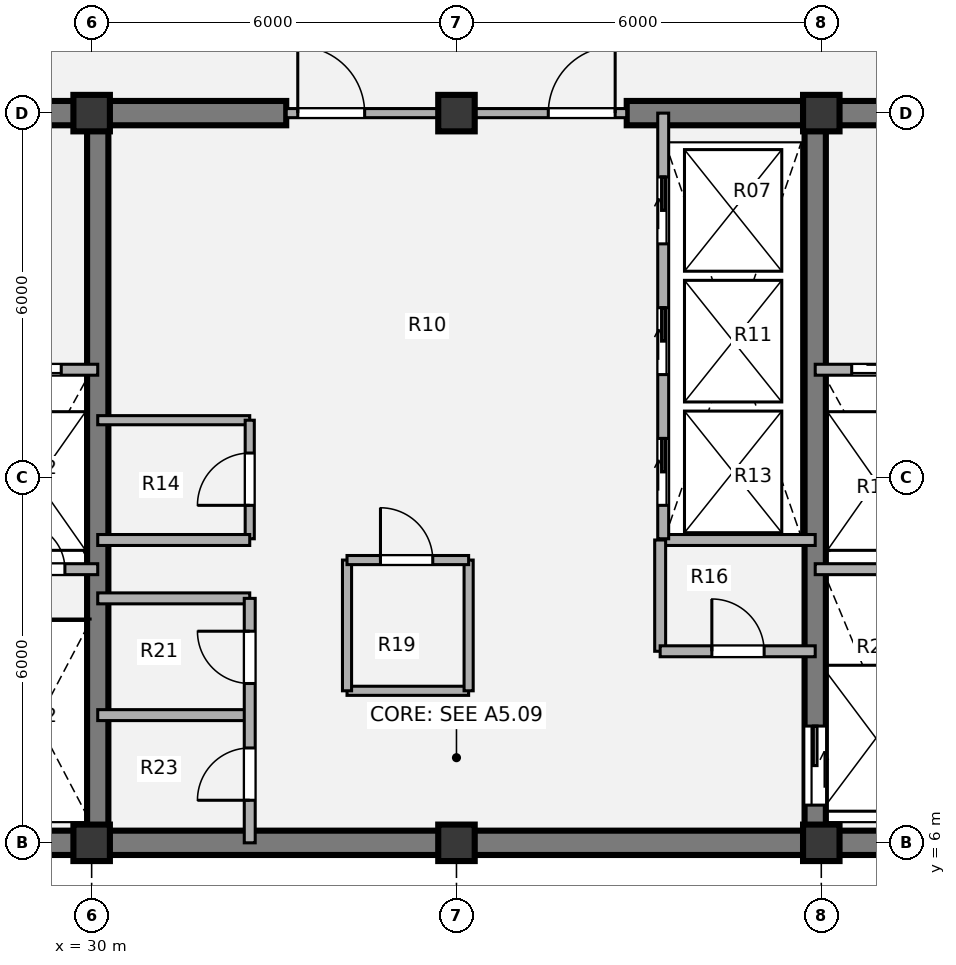
"""IFC4 building model, lengths in metres.
Left out: names, types, materials, properties, quantities, classifications, styles, units other than length and angle.
Written with IfcOpenShell. Run it as: python <this file> out.ifc"""

import sys

from ifc_helpers import new_model, si_unit, direction, frame, frame_2d, origin, origin_2d, place, context, subcontext, project, spatial, rectangle, extrude, source, transform, mapped, element, fill, save


model = new_model("IFC4")
c1 = context("Model", 3, precision=1e-05, world=origin(), true_north=direction((0.0, 1.0)))
c2 = subcontext(c1, "Body", "Model", "MODEL_VIEW")
j1 = project(units=[si_unit("LENGTHUNIT", "METRE"), si_unit("PLANEANGLEUNIT", "RADIAN")], contexts=[c1])
p1 = place(None, origin())
s1 = spatial("IfcSite", under=j1, at=p1, CompositionType="ELEMENT")
p2 = place(p1, origin())
s2 = spatial("IfcBuilding", under=s1, at=p2, CompositionType="ELEMENT")
p3 = place(p2, frame((0.0, 0.0, 287.28)))
s3 = spatial("IfcBuildingStorey", under=s2, at=p3, CompositionType="ELEMENT", Elevation=287.28)
m1 = source(origin(), c2, "Body", "SweptSolid", [
    extrude(rectangle(XDim=0.6, YDim=0.6, at=origin_2d()), origin(), (0.0, 0.0, 1.0), 3.78),
])
for number, where, z_axis, x_axis in (
    (1, (30.0, 6.0, 0.0), (0.0, 0.0, 1.0), (1.0, 0.0, 0.0)),
    (2, (36.0, 6.0, 0.0), (0.0, 0.0, 1.0), (1.0, 0.0, 0.0)),
    (3, (42.0, 6.0, 0.0), (0.0, 0.0, 1.0), (1.0, 0.0, 0.0)),
    (4, (30.0, 18.0, 0.0), (0.0, 0.0, 1.0), (1.0, 0.0, 0.0)),
    (5, (36.0, 18.0, 0.0), (0.0, 0.0, 1.0), (1.0, 0.0, 0.0)),
    (6, (42.0, 18.0, 0.0), (0.0, 0.0, 1.0), (1.0, 0.0, 0.0)),
):
    element("IfcColumn", number, at=place(p3, frame(where, z_axis=z_axis, x_axis=x_axis)), inside=s3, PredefinedType="COLUMN", context=c2, shape_type="MappedRepresentation", body=[
        mapped(m1, transform((0.0, 0.0, 0.0), x_axis=(1.0, 0.0, 0.0), y_axis=(0.0, 1.0, 0.0), z_axis=(0.0, 0.0, 1.0), scale=1.0)),
    ])
p4 = place(p3, frame((48.2, 6.0, 0.0), z_axis=(0.0, 0.0, 1.0), x_axis=(-1.0, 0.0, 0.0)))
e7 = element("IfcWall", 7, at=p4, inside=s3, PredefinedType="SHEAR", context=c2, shape_type="SweptSolid", body=[
    extrude(rectangle(XDim=24.4, YDim=0.4, at=frame_2d((12.2, 0.0))), origin(), (0.0, 0.0, 1.0), 3.78),
])
p5 = place(p3, frame((23.8, 18.0, 0.0), z_axis=(0.0, 0.0, 1.0), x_axis=(1.0, 0.0, 0.0)))
e8 = element("IfcWall", 8, at=p5, inside=s3, PredefinedType="SHEAR", context=c2, shape_type="SweptSolid", body=[
    extrude(rectangle(XDim=9.4, YDim=0.4, at=frame_2d((4.7, 0.0))), origin(), (0.0, 0.0, 1.0), 3.78),
])
p6 = place(p5, frame((2.95, 0.0, 0.0)))
e9 = element("IfcOpeningElement", 9, at=p6, cuts=e8, PredefinedType="OPENING", context=c2, shape_type="SweptSolid", body=[
    extrude(rectangle(XDim=1.1, YDim=2.1, at=origin_2d()), frame((0.55, 0.21, 1.05), z_axis=(0.0, -1.0, 0.0), x_axis=(1.0, 0.0, 0.0)), (0.0, 0.0, 1.0), 0.42),
])
p7 = place(p3, frame((38.8, 18.0, 0.0), z_axis=(0.0, 0.0, 1.0), x_axis=(1.0, 0.0, 0.0)))
e10 = element("IfcWall", 10, at=p7, inside=s3, PredefinedType="SHEAR", context=c2, shape_type="SweptSolid", body=[
    extrude(rectangle(XDim=9.4, YDim=0.4, at=frame_2d((4.7, 0.0))), origin(), (0.0, 0.0, 1.0), 3.78),
])
p8 = place(p7, frame((5.45, 0.0, 0.0)))
e11 = element("IfcOpeningElement", 11, at=p8, cuts=e10, PredefinedType="OPENING", context=c2, shape_type="SweptSolid", body=[
    extrude(rectangle(XDim=1.1, YDim=2.1, at=origin_2d()), frame((0.55, 0.21, 1.05), z_axis=(0.0, -1.0, 0.0), x_axis=(1.0, 0.0, 0.0)), (0.0, 0.0, 1.0), 0.42),
])
p9 = place(p3, frame((30.1, 6.0, 0.0), z_axis=(0.0, 0.0, 1.0), x_axis=(0.0, 1.0, 0.0)))
e12 = element("IfcWall", 12, at=p9, inside=s3, PredefinedType="SHEAR", context=c2, shape_type="SweptSolid", body=[
    extrude(rectangle(XDim=12.0, YDim=0.35, at=frame_2d((6.0, 0.0))), origin(), (0.0, 0.0, 1.0), 3.78),
])
p10 = place(p3, frame((41.9, 18.0, 0.0), z_axis=(0.0, 0.0, 1.0), x_axis=(0.0, -1.0, 0.0)))
e13 = element("IfcWall", 13, at=p10, inside=s3, PredefinedType="SHEAR", context=c2, shape_type="SweptSolid", body=[
    extrude(rectangle(XDim=12.0, YDim=0.35, at=frame_2d((6.0, 0.0))), origin(), (0.0, 0.0, 1.0), 3.78),
])
p11 = place(p10, frame((10.08, 0.0, 0.0)))
e14 = element("IfcOpeningElement", 14, at=p11, cuts=e13, PredefinedType="OPENING", context=c2, shape_type="SweptSolid", body=[
    extrude(rectangle(XDim=1.3, YDim=2.1, at=origin_2d()), frame((0.65, 0.185, 1.05), z_axis=(0.0, -1.0, 0.0), x_axis=(1.0, 0.0, 0.0)), (0.0, 0.0, 1.0), 0.37),
])
p12 = place(p3, frame((30.1, 12.95, 0.0), z_axis=(0.0, 0.0, 1.0), x_axis=(1.0, 0.0, 0.0)))
e15 = element("IfcWall", 15, at=p12, inside=s3, PredefinedType="PARTITIONING", context=c2, shape_type="SweptSolid", body=[
    extrude(rectangle(XDim=2.5, YDim=0.15, at=frame_2d((1.25, 0.0))), origin(), (0.0, 0.0, 1.0), 3.43),
])
p13 = place(p3, frame((32.6, 11.0, 0.0), z_axis=(0.0, 0.0, 1.0), x_axis=(0.0, 1.0, 0.0)))
e16 = element("IfcWall", 16, at=p13, inside=s3, PredefinedType="PARTITIONING", context=c2, shape_type="SweptSolid", body=[
    extrude(rectangle(XDim=1.95, YDim=0.15, at=frame_2d((0.975, 0.0))), origin(), (0.0, 0.0, 1.0), 3.43),
])
p14 = place(p13, frame((0.55, 0.0, 0.0)))
e17 = element("IfcOpeningElement", 17, at=p14, cuts=e16, PredefinedType="OPENING", context=c2, shape_type="SweptSolid", body=[
    extrude(rectangle(XDim=0.86, YDim=2.1, at=origin_2d()), frame((0.43, 0.085, 1.05), z_axis=(0.0, -1.0, 0.0), x_axis=(1.0, 0.0, 0.0)), (0.0, 0.0, 1.0), 0.17),
])
p15 = place(p3, frame((34.2, 8.5, 0.0), z_axis=(0.0, 0.0, 1.0), x_axis=(1.0, 0.0, 0.0)))
e18 = element("IfcWall", 18, at=p15, inside=s3, PredefinedType="PARTITIONING", context=c2, shape_type="SweptSolid", body=[
    extrude(rectangle(XDim=2.0, YDim=0.15, at=frame_2d((1.0, 0.0))), origin(), (0.0, 0.0, 1.0), 3.43),
])
p16 = place(p3, frame((34.2, 8.5, 0.0), z_axis=(0.0, 0.0, 1.0), x_axis=(0.0, 1.0, 0.0)))
e19 = element("IfcWall", 19, at=p16, inside=s3, PredefinedType="PARTITIONING", context=c2, shape_type="SweptSolid", body=[
    extrude(rectangle(XDim=2.15, YDim=0.15, at=frame_2d((1.075, 0.0))), origin(), (0.0, 0.0, 1.0), 3.43),
])
p17 = place(p3, frame((36.2, 8.5, 0.0), z_axis=(0.0, 0.0, 1.0), x_axis=(0.0, 1.0, 0.0)))
e20 = element("IfcWall", 20, at=p17, inside=s3, PredefinedType="PARTITIONING", context=c2, shape_type="SweptSolid", body=[
    extrude(rectangle(XDim=2.15, YDim=0.15, at=frame_2d((1.075, 0.0))), origin(), (0.0, 0.0, 1.0), 2.645),
])
p18 = place(p3, frame((34.2, 10.65, 0.0), z_axis=(0.0, 0.0, 1.0), x_axis=(1.0, 0.0, 0.0)))
e21 = element("IfcWall", 21, at=p18, inside=s3, PredefinedType="PARTITIONING", context=c2, shape_type="SweptSolid", body=[
    extrude(rectangle(XDim=2.0, YDim=0.15, at=frame_2d((1.0, 0.0))), origin(), (0.0, 0.0, 1.0), 3.43),
])
p19 = place(p18, frame((0.55, 0.0, 0.0)))
e22 = element("IfcOpeningElement", 22, at=p19, cuts=e21, PredefinedType="OPENING", context=c2, shape_type="SweptSolid", body=[
    extrude(rectangle(XDim=0.86, YDim=2.1, at=origin_2d()), frame((0.43, 0.085, 1.05), z_axis=(0.0, -1.0, 0.0), x_axis=(1.0, 0.0, 0.0)), (0.0, 0.0, 1.0), 0.17),
])
p20 = place(p3, frame((30.1, 10.98, 0.0), z_axis=(0.0, 0.0, 1.0), x_axis=(1.0, 0.0, 0.0)))
e23 = element("IfcWall", 23, at=p20, inside=s3, PredefinedType="PARTITIONING", context=c2, shape_type="SweptSolid", body=[
    extrude(rectangle(XDim=2.5, YDim=0.18, at=frame_2d((1.25, 0.0))), origin(), (0.0, 0.0, 1.0), 3.43),
])
p21 = place(p3, frame((39.35, 10.98, 0.0), z_axis=(0.0, 0.0, 1.0), x_axis=(1.0, 0.0, 0.0)))
e24 = element("IfcWall", 24, at=p21, inside=s3, PredefinedType="PARTITIONING", context=c2, shape_type="SweptSolid", body=[
    extrude(rectangle(XDim=2.55, YDim=0.18, at=frame_2d((1.275, 0.0))), origin(), (0.0, 0.0, 1.0), 3.43),
])
for number, where, z_axis, x_axis in (
    (25, (30.1, 8.1, 0.0), (0.0, 0.0, 1.0), (1.0, 0.0, 0.0)),
    (26, (30.1, 10.02, 0.0), (0.0, 0.0, 1.0), (1.0, 0.0, 0.0)),
):
    element("IfcWall", number, at=place(p3, frame(where, z_axis=z_axis, x_axis=x_axis)), inside=s3, PredefinedType="PARTITIONING", context=c2, shape_type="SweptSolid", body=[
        extrude(rectangle(XDim=2.5, YDim=0.18, at=frame_2d((1.25, 0.0))), origin(), (0.0, 0.0, 1.0), 3.43),
    ])
p22 = place(p3, frame((32.6, 6.0, 0.0), z_axis=(0.0, 0.0, 1.0), x_axis=(0.0, 1.0, 0.0)))
e27 = element("IfcWall", 27, at=p22, inside=s3, PredefinedType="PARTITIONING", context=c2, shape_type="SweptSolid", body=[
    extrude(rectangle(XDim=4.02, YDim=0.18, at=frame_2d((2.01, 0.0))), origin(), (0.0, 0.0, 1.0), 3.43),
])
p23 = place(p22, frame((0.7, 0.0, 0.0)))
e28 = element("IfcOpeningElement", 28, at=p23, cuts=e27, PredefinedType="OPENING", context=c2, shape_type="SweptSolid", body=[
    extrude(rectangle(XDim=0.86, YDim=2.1, at=origin_2d()), frame((0.43, 0.1, 1.05), z_axis=(0.0, -1.0, 0.0), x_axis=(1.0, 0.0, 0.0)), (0.0, 0.0, 1.0), 0.2),
])
p24 = place(p22, frame((2.62, 0.0, 0.0)))
e29 = element("IfcOpeningElement", 29, at=p24, cuts=e27, PredefinedType="OPENING", context=c2, shape_type="SweptSolid", body=[
    extrude(rectangle(XDim=0.86, YDim=2.1, at=origin_2d()), frame((0.43, 0.1, 1.05), z_axis=(0.0, -1.0, 0.0), x_axis=(1.0, 0.0, 0.0)), (0.0, 0.0, 1.0), 0.2),
])
p25 = place(p3, frame((39.35, 9.15, 0.0), z_axis=(0.0, 0.0, 1.0), x_axis=(0.0, 1.0, 0.0)))
e30 = element("IfcWall", 30, at=p25, inside=s3, PredefinedType="PARTITIONING", context=c2, shape_type="SweptSolid", body=[
    extrude(rectangle(XDim=1.83, YDim=0.18, at=frame_2d((0.915, 0.0))), origin(), (0.0, 0.0, 1.0), 3.43),
])
p26 = place(p3, frame((39.35, 9.15, 0.0), z_axis=(0.0, 0.0, 1.0), x_axis=(1.0, 0.0, 0.0)))
e31 = element("IfcWall", 31, at=p26, inside=s3, PredefinedType="PARTITIONING", context=c2, shape_type="SweptSolid", body=[
    extrude(rectangle(XDim=2.55, YDim=0.18, at=frame_2d((1.275, 0.0))), origin(), (0.0, 0.0, 1.0), 3.43),
])
p27 = place(p26, frame((0.85, 0.0, 0.0)))
e32 = element("IfcOpeningElement", 32, at=p27, cuts=e31, PredefinedType="OPENING", context=c2, shape_type="SweptSolid", body=[
    extrude(rectangle(XDim=0.86, YDim=2.1, at=origin_2d()), frame((0.43, 0.1, 1.05), z_axis=(0.0, -1.0, 0.0), x_axis=(1.0, 0.0, 0.0)), (0.0, 0.0, 1.0), 0.2),
])
p28 = place(p3, frame((33.2, 18.0, 0.0), z_axis=(0.0, 0.0, 1.0), x_axis=(1.0, 0.0, 0.0)))
e33 = element("IfcWall", 33, at=p28, inside=s3, PredefinedType="PARTITIONING", context=c2, shape_type="SweptSolid", body=[
    extrude(rectangle(XDim=5.6, YDim=0.15, at=frame_2d((2.8, 0.0))), origin(), (0.0, 0.0, 1.0), 2.445),
])
p29 = place(p28, frame((0.19, 0.0, 0.0)))
e34 = element("IfcOpeningElement", 34, at=p29, cuts=e33, PredefinedType="OPENING", context=c2, shape_type="SweptSolid", body=[
    extrude(rectangle(XDim=1.1, YDim=2.1, at=origin_2d()), frame((0.55, 0.085, 1.05), z_axis=(0.0, -1.0, 0.0), x_axis=(1.0, 0.0, 0.0)), (0.0, 0.0, 1.0), 0.17),
])
p30 = place(p28, frame((4.31, 0.0, 0.0)))
e35 = element("IfcOpeningElement", 35, at=p30, cuts=e33, PredefinedType="OPENING", context=c2, shape_type="SweptSolid", body=[
    extrude(rectangle(XDim=1.1, YDim=2.1, at=origin_2d()), frame((0.55, 0.085, 1.05), z_axis=(0.0, -1.0, 0.0), x_axis=(1.0, 0.0, 0.0)), (0.0, 0.0, 1.0), 0.17),
])
p31 = place(p3, frame((24.0, 13.78, 0.0), z_axis=(0.0, 0.0, 1.0), x_axis=(1.0, 0.0, 0.0)))
e36 = element("IfcWall", 36, at=p31, inside=s3, PredefinedType="PARTITIONING", context=c2, shape_type="SweptSolid", body=[
    extrude(rectangle(XDim=6.1, YDim=0.18, at=frame_2d((3.05, 0.0))), origin(), (0.0, 0.0, 1.0), 3.43),
])
p32 = place(p31, frame((1.15, 0.0, 0.0)))
e37 = element("IfcOpeningElement", 37, at=p32, cuts=e36, PredefinedType="OPENING", context=c2, shape_type="SweptSolid", body=[
    extrude(rectangle(XDim=1.1, YDim=2.1, at=origin_2d()), frame((0.55, 0.1, 1.05), z_axis=(0.0, -1.0, 0.0), x_axis=(1.0, 0.0, 0.0)), (0.0, 0.0, 1.0), 0.2),
])
p33 = place(p31, frame((4.4, 0.0, 0.0)))
e38 = element("IfcOpeningElement", 38, at=p33, cuts=e36, PredefinedType="OPENING", context=c2, shape_type="SweptSolid", body=[
    extrude(rectangle(XDim=1.1, YDim=2.1, at=origin_2d()), frame((0.55, 0.1, 1.05), z_axis=(0.0, -1.0, 0.0), x_axis=(1.0, 0.0, 0.0)), (0.0, 0.0, 1.0), 0.2),
])
p34 = place(p3, frame((28.15, 10.5, 0.0), z_axis=(0.0, 0.0, 1.0), x_axis=(1.0, 0.0, 0.0)))
e39 = element("IfcWall", 39, at=p34, inside=s3, PredefinedType="PARTITIONING", context=c2, shape_type="SweptSolid", body=[
    extrude(rectangle(XDim=1.95, YDim=0.18, at=frame_2d((0.975, 0.0))), origin(), (0.0, 0.0, 1.0), 3.43),
])
p35 = place(p34, frame((0.65, 0.0, 0.0)))
e40 = element("IfcOpeningElement", 40, at=p35, cuts=e39, PredefinedType="OPENING", context=c2, shape_type="SweptSolid", body=[
    extrude(rectangle(XDim=0.76, YDim=2.05, at=origin_2d()), frame((0.38, 0.1, 1.025), z_axis=(0.0, -1.0, 0.0), x_axis=(1.0, 0.0, 0.0)), (0.0, 0.0, 1.0), 0.2),
])
p36 = place(p3, frame((41.9, 13.78, 0.0), z_axis=(0.0, 0.0, 1.0), x_axis=(1.0, 0.0, 0.0)))
e41 = element("IfcWall", 41, at=p36, inside=s3, PredefinedType="PARTITIONING", context=c2, shape_type="SweptSolid", body=[
    extrude(rectangle(XDim=6.1, YDim=0.18, at=frame_2d((3.05, 0.0))), origin(), (0.0, 0.0, 1.0), 3.43),
])
p37 = place(p36, frame((0.6, 0.0, 0.0)))
e42 = element("IfcOpeningElement", 42, at=p37, cuts=e41, PredefinedType="OPENING", context=c2, shape_type="SweptSolid", body=[
    extrude(rectangle(XDim=1.1, YDim=2.1, at=origin_2d()), frame((0.55, 0.1, 1.05), z_axis=(0.0, -1.0, 0.0), x_axis=(1.0, 0.0, 0.0)), (0.0, 0.0, 1.0), 0.2),
])
p38 = place(p36, frame((3.8, 0.0, 0.0)))
e43 = element("IfcOpeningElement", 43, at=p38, cuts=e41, PredefinedType="OPENING", context=c2, shape_type="SweptSolid", body=[
    extrude(rectangle(XDim=1.1, YDim=2.1, at=origin_2d()), frame((0.55, 0.1, 1.05), z_axis=(0.0, -1.0, 0.0), x_axis=(1.0, 0.0, 0.0)), (0.0, 0.0, 1.0), 0.2),
])
p39 = place(p3, frame((41.9, 10.5, 0.0), z_axis=(0.0, 0.0, 1.0), x_axis=(1.0, 0.0, 0.0)))
e44 = element("IfcWall", 44, at=p39, inside=s3, PredefinedType="PARTITIONING", context=c2, shape_type="SweptSolid", body=[
    extrude(rectangle(XDim=1.95, YDim=0.18, at=frame_2d((0.975, 0.0))), origin(), (0.0, 0.0, 1.0), 3.43),
])
p40 = place(p3, frame((39.4, 11.0, 0.0), z_axis=(0.0, 0.0, 1.0), x_axis=(0.0, 1.0, 0.0)))
e45 = element("IfcWall", 45, at=p40, inside=s3, PredefinedType="PARTITIONING", context=c2, shape_type="SweptSolid", body=[
    extrude(rectangle(XDim=7.0, YDim=0.18, at=frame_2d((3.5, 0.0))), origin(), (0.0, 0.0, 1.0), 3.43),
])
p41 = place(p40, frame((0.55, 0.0, 0.0)))
e46 = element("IfcOpeningElement", 46, at=p41, cuts=e45, PredefinedType="OPENING", context=c2, shape_type="SweptSolid", body=[
    extrude(rectangle(XDim=1.1, YDim=2.1, at=origin_2d()), frame((0.55, 0.1, 1.05), z_axis=(0.0, -1.0, 0.0), x_axis=(1.0, 0.0, 0.0)), (0.0, 0.0, 1.0), 0.2),
])
p42 = place(p40, frame((2.7, 0.0, 0.0)))
e47 = element("IfcOpeningElement", 47, at=p42, cuts=e45, PredefinedType="OPENING", context=c2, shape_type="SweptSolid", body=[
    extrude(rectangle(XDim=1.1, YDim=2.1, at=origin_2d()), frame((0.55, 0.1, 1.05), z_axis=(0.0, -1.0, 0.0), x_axis=(1.0, 0.0, 0.0)), (0.0, 0.0, 1.0), 0.2),
])
p43 = place(p40, frame((4.85, 0.0, 0.0)))
e48 = element("IfcOpeningElement", 48, at=p43, cuts=e45, PredefinedType="OPENING", context=c2, shape_type="SweptSolid", body=[
    extrude(rectangle(XDim=1.1, YDim=2.1, at=origin_2d()), frame((0.55, 0.1, 1.05), z_axis=(0.0, -1.0, 0.0), x_axis=(1.0, 0.0, 0.0)), (0.0, 0.0, 1.0), 0.2),
])
m2 = source(origin(), c2, "Body", "SweptSolid", [
    extrude(rectangle(XDim=0.86, YDim=2.1, at=origin_2d()), frame((0.43, 0.025, 1.05), z_axis=(0.0, -1.0, 0.0), x_axis=(1.0, 0.0, 0.0)), (0.0, 0.0, 1.0), 0.05),
])
p44 = place(p14, origin())
e49 = element("IfcDoor", 49, at=p44, inside=s3, OperationType="SINGLE_SWING_LEFT", PredefinedType="DOOR", context=c2, shape_type="MappedRepresentation", body=[
    mapped(m2, transform((0.0, 0.0, 0.0), x_axis=(1.0, 0.0, 0.0), y_axis=(0.0, 1.0, 0.0), z_axis=(0.0, 0.0, 1.0), scale=1.0)),
])
fill(e17, e49)
p45 = place(p19, origin())
e50 = element("IfcDoor", 50, at=p45, inside=s3, OperationType="SINGLE_SWING_LEFT", PredefinedType="DOOR", context=c2, shape_type="MappedRepresentation", body=[
    mapped(m2, transform((0.0, 0.0, 0.0), x_axis=(1.0, 0.0, 0.0), y_axis=(0.0, 1.0, 0.0), z_axis=(0.0, 0.0, 1.0), scale=1.0)),
])
fill(e22, e50)
p46 = place(p23, origin())
e51 = element("IfcDoor", 51, at=p46, inside=s3, OperationType="SINGLE_SWING_LEFT", PredefinedType="DOOR", context=c2, shape_type="MappedRepresentation", body=[
    mapped(m2, transform((0.0, 0.0, 0.0), x_axis=(1.0, 0.0, 0.0), y_axis=(0.0, 1.0, 0.0), z_axis=(0.0, 0.0, 1.0), scale=1.0)),
])
fill(e28, e51)
p47 = place(p24, origin())
e52 = element("IfcDoor", 52, at=p47, inside=s3, OperationType="SINGLE_SWING_RIGHT", PredefinedType="DOOR", context=c2, shape_type="MappedRepresentation", body=[
    mapped(m2, transform((0.0, 0.0, 0.0), x_axis=(1.0, 0.0, 0.0), y_axis=(0.0, 1.0, 0.0), z_axis=(0.0, 0.0, 1.0), scale=1.0)),
])
fill(e29, e52)
p48 = place(p27, origin())
e53 = element("IfcDoor", 53, at=p48, inside=s3, OperationType="SINGLE_SWING_LEFT", PredefinedType="DOOR", context=c2, shape_type="MappedRepresentation", body=[
    mapped(m2, transform((0.0, 0.0, 0.0), x_axis=(1.0, 0.0, 0.0), y_axis=(0.0, 1.0, 0.0), z_axis=(0.0, 0.0, 1.0), scale=1.0)),
])
fill(e32, e53)
m3 = source(origin(), c2, "Body", "SweptSolid", [
    extrude(rectangle(XDim=1.1, YDim=2.1, at=origin_2d()), frame((0.55, 0.025, 1.05), z_axis=(0.0, -1.0, 0.0), x_axis=(1.0, 0.0, 0.0)), (0.0, 0.0, 1.0), 0.05),
])
p49 = place(p29, origin())
e54 = element("IfcDoor", 54, at=p49, inside=s3, OperationType="SINGLE_SWING_LEFT", PredefinedType="DOOR", context=c2, shape_type="MappedRepresentation", body=[
    mapped(m3, transform((0.0, 0.0, 0.0), x_axis=(1.0, 0.0, 0.0), y_axis=(0.0, 1.0, 0.0), z_axis=(0.0, 0.0, 1.0), scale=1.0)),
])
fill(e34, e54)
p50 = place(p30, origin())
e55 = element("IfcDoor", 55, at=p50, inside=s3, OperationType="SINGLE_SWING_RIGHT", PredefinedType="DOOR", context=c2, shape_type="MappedRepresentation", body=[
    mapped(m3, transform((0.0, 0.0, 0.0), x_axis=(1.0, 0.0, 0.0), y_axis=(0.0, 1.0, 0.0), z_axis=(0.0, 0.0, 1.0), scale=1.0)),
])
fill(e35, e55)
m4 = source(origin(), c2, "Body", "SweptSolid", [
    extrude(rectangle(XDim=1.1, YDim=2.1, at=origin_2d()), frame((0.55, 0.025, 1.05), z_axis=(0.0, -1.0, 0.0), x_axis=(1.0, 0.0, 0.0)), (0.0, 0.0, 1.0), 0.05),
])
p51 = place(p33, origin())
e56 = element("IfcDoor", 56, at=p51, inside=s3, OperationType="SLIDING_TO_LEFT", PredefinedType="DOOR", context=c2, shape_type="MappedRepresentation", body=[
    mapped(m4, transform((0.0, 0.0, 0.0), x_axis=(1.0, 0.0, 0.0), y_axis=(0.0, 1.0, 0.0), z_axis=(0.0, 0.0, 1.0), scale=1.0)),
])
fill(e38, e56)
m5 = source(origin(), c2, "Body", "SweptSolid", [
    extrude(rectangle(XDim=0.76, YDim=2.05, at=origin_2d()), frame((0.38, 0.025, 1.025), z_axis=(0.0, -1.0, 0.0), x_axis=(1.0, 0.0, 0.0)), (0.0, 0.0, 1.0), 0.05),
])
p52 = place(p35, origin())
e57 = element("IfcDoor", 57, at=p52, inside=s3, OperationType="SINGLE_SWING_LEFT", PredefinedType="DOOR", context=c2, shape_type="MappedRepresentation", body=[
    mapped(m5, transform((0.0, 0.0, 0.0), x_axis=(1.0, 0.0, 0.0), y_axis=(0.0, 1.0, 0.0), z_axis=(0.0, 0.0, 1.0), scale=1.0)),
])
fill(e40, e57)
p53 = place(p37, origin())
e58 = element("IfcDoor", 58, at=p53, inside=s3, OperationType="SLIDING_TO_RIGHT", PredefinedType="DOOR", context=c2, shape_type="MappedRepresentation", body=[
    mapped(m4, transform((0.0, 0.0, 0.0), x_axis=(1.0, 0.0, 0.0), y_axis=(0.0, 1.0, 0.0), z_axis=(0.0, 0.0, 1.0), scale=1.0)),
])
fill(e42, e58)
m6 = source(origin(), c2, "Body", "SweptSolid", [
    extrude(rectangle(XDim=1.3, YDim=2.1, at=origin_2d()), frame((0.65, 0.025, 1.05), z_axis=(0.0, -1.0, 0.0), x_axis=(1.0, 0.0, 0.0)), (0.0, 0.0, 1.0), 0.05),
])
p54 = place(p11, origin())
e59 = element("IfcDoor", 59, at=p54, inside=s3, OperationType="SLIDING_TO_LEFT", PredefinedType="DOOR", context=c2, shape_type="MappedRepresentation", body=[
    mapped(m6, transform((0.0, 0.0, 0.0), x_axis=(1.0, 0.0, 0.0), y_axis=(0.0, 1.0, 0.0), z_axis=(0.0, 0.0, 1.0), scale=1.0)),
])
fill(e14, e59)
p55 = place(p41, origin())
e60 = element("IfcDoor", 60, at=p55, inside=s3, OperationType="SLIDING_TO_RIGHT", PredefinedType="DOOR", context=c2, shape_type="MappedRepresentation", body=[
    mapped(m4, transform((0.0, 0.0, 0.0), x_axis=(1.0, 0.0, 0.0), y_axis=(0.0, 1.0, 0.0), z_axis=(0.0, 0.0, 1.0), scale=1.0)),
])
fill(e46, e60)
p56 = place(p42, origin())
e61 = element("IfcDoor", 61, at=p56, inside=s3, OperationType="SLIDING_TO_RIGHT", PredefinedType="DOOR", context=c2, shape_type="MappedRepresentation", body=[
    mapped(m4, transform((0.0, 0.0, 0.0), x_axis=(1.0, 0.0, 0.0), y_axis=(0.0, 1.0, 0.0), z_axis=(0.0, 0.0, 1.0), scale=1.0)),
])
fill(e47, e61)
p57 = place(p43, origin())
e62 = element("IfcDoor", 62, at=p57, inside=s3, OperationType="SLIDING_TO_RIGHT", PredefinedType="DOOR", context=c2, shape_type="MappedRepresentation", body=[
    mapped(m4, transform((0.0, 0.0, 0.0), x_axis=(1.0, 0.0, 0.0), y_axis=(0.0, 1.0, 0.0), z_axis=(0.0, 0.0, 1.0), scale=1.0)),
])
fill(e48, e62)
save(model, sys.argv[1])
